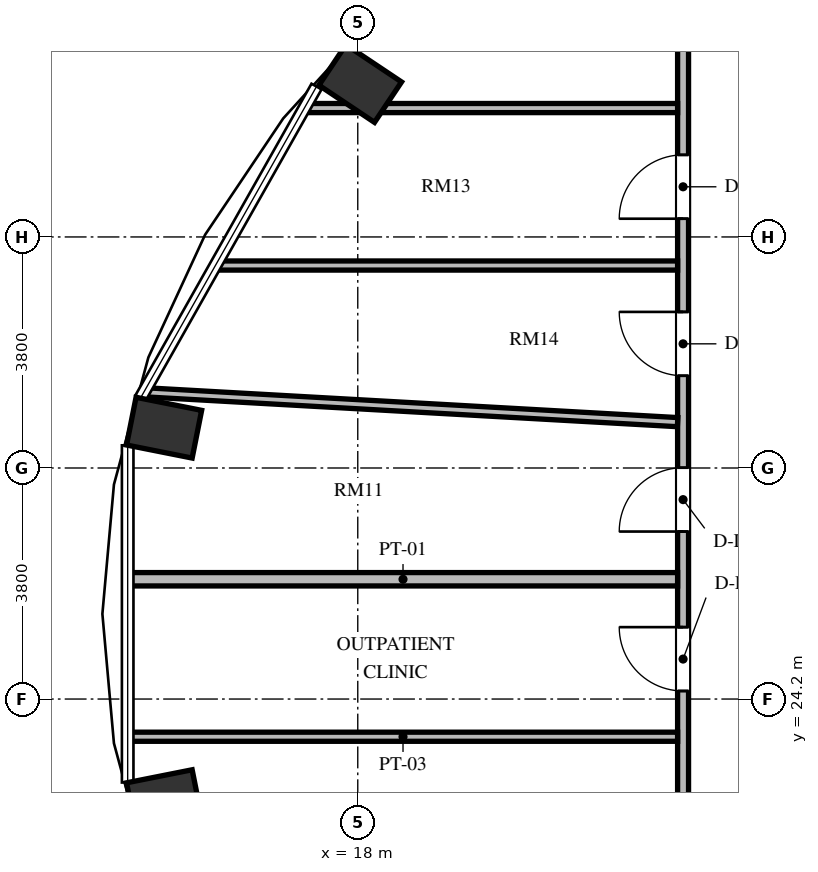
"""IFC4 building model, lengths in metres.
Left out: names, types, materials, properties, quantities, classifications, styles, units other than length and angle.
Written with IfcOpenShell. Run it as: python <this file> out.ifc"""

import sys

from ifc_helpers import new_model, si_unit, direction, frame, frame_2d, origin, origin_2d, place, context, subcontext, project, spatial, rectangle, extrude, element, fill, save


model = new_model("IFC4")
c1 = context("Model", 3, precision=1e-05, world=origin(), true_north=direction((0.0, 1.0)))
c2 = subcontext(c1, "Body", "Model", "MODEL_VIEW")
j1 = project(units=[si_unit("LENGTHUNIT", "METRE"), si_unit("PLANEANGLEUNIT", "RADIAN")], contexts=[c1])
p1 = place(None, origin())
s1 = spatial("IfcSite", under=j1, at=p1, CompositionType="ELEMENT")
p2 = place(p1, origin())
s2 = spatial("IfcBuilding", under=s1, at=p2, CompositionType="ELEMENT")
p3 = place(p2, frame((0.0, 0.0, 205.776)))
s3 = spatial("IfcBuildingStorey", under=s2, at=p3, CompositionType="ELEMENT", Elevation=205.776)
for number, where, z_axis, x_axis in (
    (1, (18.04, 34.323, 0.0), (0.0, 0.0, 1.0), (-0.831, 0.556, 0.0)),
    (2, (14.815, 28.663, 0.0), (0.0, 0.0, 1.0), (-0.981, 0.195, 0.0)),
    (3, (14.815, 22.537, 0.0), (0.0, 0.0, 1.0), (-0.981, -0.195, 0.0)),
):
    element("IfcColumn", number, at=place(p3, frame(where, z_axis=z_axis, x_axis=x_axis)), inside=s3, PredefinedType="COLUMN", context=c2, shape_type="SweptSolid", body=[
        extrude(rectangle(XDim=1.1, YDim=0.8, at=origin_2d()), origin(), (0.0, 0.0, 1.0), 3.648),
    ])
p4 = place(p3, frame((23.35, 19.98, 0.0), z_axis=(0.0, 0.0, 1.0), x_axis=(0.0, 1.0, 0.0)))
e4 = element("IfcWall", 4, at=p4, inside=s3, PredefinedType="PARTITIONING", context=c2, shape_type="SweptSolid", body=[
    extrude(rectangle(XDim=16.042, YDim=0.18, at=frame_2d((8.021, 0.0))), origin(), (0.0, 0.0, 1.0), 3.448),
])
p5 = place(p4, frame((6.975, 0.0, 0.0)))
e5 = element("IfcOpeningElement", 5, at=p5, cuts=e4, PredefinedType="OPENING", context=c2, shape_type="SweptSolid", body=[
    extrude(rectangle(XDim=1.05, YDim=2.15, at=frame_2d((0.525, 1.075))), frame((0.0, 0.1, 0.0), z_axis=(0.0, -1.0, 0.0), x_axis=(1.0, 0.0, 0.0)), (0.0, 0.0, 1.0), 0.2),
])
p6 = place(p4, frame((4.353, 0.0, 0.0)))
e6 = element("IfcOpeningElement", 6, at=p6, cuts=e4, PredefinedType="OPENING", context=c2, shape_type="SweptSolid", body=[
    extrude(rectangle(XDim=1.05, YDim=2.15, at=frame_2d((0.525, 1.075))), frame((0.0, 0.1, 0.0), z_axis=(0.0, -1.0, 0.0), x_axis=(1.0, 0.0, 0.0)), (0.0, 0.0, 1.0), 0.2),
])
p7 = place(p4, frame((12.12, 0.0, 0.0)))
e7 = element("IfcOpeningElement", 7, at=p7, cuts=e4, PredefinedType="OPENING", context=c2, shape_type="SweptSolid", body=[
    extrude(rectangle(XDim=1.05, YDim=2.15, at=frame_2d((0.525, 1.075))), frame((0.0, 0.1, 0.0), z_axis=(0.0, -1.0, 0.0), x_axis=(1.0, 0.0, 0.0)), (0.0, 0.0, 1.0), 0.2),
])
p8 = place(p4, frame((9.537, 0.0, 0.0)))
e8 = element("IfcOpeningElement", 8, at=p8, cuts=e4, PredefinedType="OPENING", context=c2, shape_type="SweptSolid", body=[
    extrude(rectangle(XDim=1.05, YDim=2.15, at=frame_2d((0.525, 1.075))), frame((0.0, 0.1, 0.0), z_axis=(0.0, -1.0, 0.0), x_axis=(1.0, 0.0, 0.0)), (0.0, 0.0, 1.0), 0.2),
])
p9 = place(p3, frame((14.228, 23.58, 0.0), z_axis=(0.0, 0.0, 1.0), x_axis=(1.0, 0.0, 0.0)))
e9 = element("IfcWall", 9, at=p9, inside=s3, PredefinedType="PARTITIONING", context=c2, shape_type="SweptSolid", body=[
    extrude(rectangle(XDim=9.032, YDim=0.15, at=frame_2d((4.516, 0.0))), origin(), (0.0, 0.0, 1.0), 3.448),
])
p10 = place(p3, frame((14.228, 26.17, 0.0), z_axis=(0.0, 0.0, 1.0), x_axis=(1.0, 0.0, 0.0)))
e10 = element("IfcWall", 10, at=p10, inside=s3, PredefinedType="PARTITIONING", context=c2, shape_type="SweptSolid", body=[
    extrude(rectangle(XDim=9.032, YDim=0.22, at=frame_2d((4.516, 0.0))), origin(), (0.0, 0.0, 1.0), 3.448),
])
p11 = place(p3, frame((14.477, 29.247, 0.0), z_axis=(0.0, 0.0, 1.0), x_axis=(0.998432044673, -0.05597724689, 0.0)))
e11 = element("IfcWall", 11, at=p11, inside=s3, PredefinedType="PARTITIONING", context=c2, shape_type="SweptSolid", body=[
    extrude(rectangle(XDim=8.797, YDim=0.15, at=frame_2d((4.398, 0.0))), origin(), (0.0, 0.0, 1.0), 3.448),
])
p12 = place(p3, frame((15.669, 31.33, 0.0), z_axis=(0.0, 0.0, 1.0), x_axis=(1.0, 0.0, 0.0)))
e12 = element("IfcWall", 12, at=p12, inside=s3, PredefinedType="PARTITIONING", context=c2, shape_type="SweptSolid", body=[
    extrude(rectangle(XDim=7.591, YDim=0.15, at=frame_2d((3.796, 0.0))), origin(), (0.0, 0.0, 1.0), 3.448),
])
p13 = place(p3, frame((17.132, 33.92, 0.0), z_axis=(0.0, 0.0, 1.0), x_axis=(1.0, 0.0, 0.0)))
e13 = element("IfcWall", 13, at=p13, inside=s3, PredefinedType="PARTITIONING", context=c2, shape_type="SweptSolid", body=[
    extrude(rectangle(XDim=6.128, YDim=0.15, at=frame_2d((3.064, 0.0))), origin(), (0.0, 0.0, 1.0), 3.448),
])
p14 = place(p5, origin())
e14 = element("IfcDoor", 14, at=p14, inside=s3, OperationType="SINGLE_SWING_LEFT", PredefinedType="DOOR", context=c2, shape_type="SweptSolid", body=[
    extrude(rectangle(XDim=1.05, YDim=2.15, at=frame_2d((0.525, 1.075))), frame((0.0, 0.025, 0.0), z_axis=(0.0, -1.0, 0.0), x_axis=(1.0, 0.0, 0.0)), (0.0, 0.0, 1.0), 0.05),
])
fill(e5, e14)
p15 = place(p6, origin())
e15 = element("IfcDoor", 15, at=p15, inside=s3, OperationType="SINGLE_SWING_RIGHT", PredefinedType="DOOR", context=c2, shape_type="SweptSolid", body=[
    extrude(rectangle(XDim=1.05, YDim=2.15, at=frame_2d((0.525, 1.075))), frame((0.0, 0.025, 0.0), z_axis=(0.0, -1.0, 0.0), x_axis=(1.0, 0.0, 0.0)), (0.0, 0.0, 1.0), 0.05),
])
fill(e6, e15)
p16 = place(p7, origin())
e16 = element("IfcDoor", 16, at=p16, inside=s3, OperationType="SINGLE_SWING_LEFT", PredefinedType="DOOR", context=c2, shape_type="SweptSolid", body=[
    extrude(rectangle(XDim=1.05, YDim=2.15, at=frame_2d((0.525, 1.075))), frame((0.0, 0.025, 0.0), z_axis=(0.0, -1.0, 0.0), x_axis=(1.0, 0.0, 0.0)), (0.0, 0.0, 1.0), 0.05),
])
fill(e7, e16)
p17 = place(p8, origin())
e17 = element("IfcDoor", 17, at=p17, inside=s3, OperationType="SINGLE_SWING_RIGHT", PredefinedType="DOOR", context=c2, shape_type="SweptSolid", body=[
    extrude(rectangle(XDim=1.05, YDim=2.15, at=frame_2d((0.525, 1.075))), frame((0.0, 0.025, 0.0), z_axis=(0.0, -1.0, 0.0), x_axis=(1.0, 0.0, 0.0)), (0.0, 0.0, 1.0), 0.05),
])
fill(e8, e17)
save(model, sys.argv[1])
